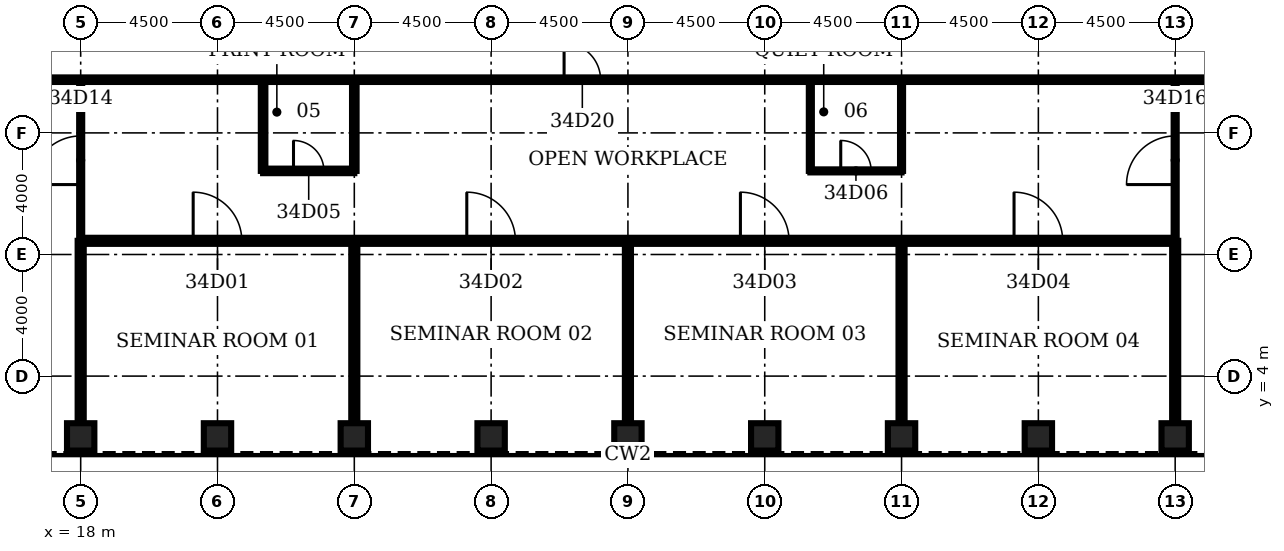
"""IFC4 building model, lengths in metres.
Left out: names, types, materials, properties, quantities, classifications, styles, units other than length and angle.
Written with IfcOpenShell. Run it as: python <this file> out.ifc"""

import sys

from ifc_helpers import new_model, si_unit, direction, frame, frame_2d, origin, origin_2d, place, context, subcontext, project, spatial, rectangle, hollow_rectangle, extrude, element, fill, save


model = new_model("IFC4")
c1 = context("Model", 3, precision=1e-05, world=origin(), true_north=direction((0.0, 1.0)))
c2 = subcontext(c1, "Body", "Model", "MODEL_VIEW")
j1 = project(units=[si_unit("LENGTHUNIT", "METRE"), si_unit("PLANEANGLEUNIT", "RADIAN")], contexts=[c1])
p1 = place(None, origin())
s1 = spatial("IfcSite", under=j1, at=p1, CompositionType="ELEMENT")
p2 = place(p1, origin())
s2 = spatial("IfcBuilding", under=s1, at=p2, CompositionType="ELEMENT")
p3 = place(p2, frame((0.0, 0.0, 155.1)))
s3 = spatial("IfcBuildingStorey", under=s2, at=p3, CompositionType="ELEMENT", Elevation=155.1)
for number, where, z_axis, x_axis in (
    (1, (18.0, 2.0, 0.0), (0.0, 0.0, 1.0), (0.0, 1.0, 0.0)),
    (2, (22.5, 2.0, 0.0), (0.0, 0.0, 1.0), (0.0, 1.0, 0.0)),
    (3, (27.0, 2.0, 0.0), (0.0, 0.0, 1.0), (0.0, 1.0, 0.0)),
    (4, (31.5, 2.0, 0.0), (0.0, 0.0, 1.0), (0.0, 1.0, 0.0)),
    (5, (36.0, 2.0, 0.0), (0.0, 0.0, 1.0), (0.0, 1.0, 0.0)),
    (6, (40.5, 2.0, 0.0), (0.0, 0.0, 1.0), (0.0, 1.0, 0.0)),
    (7, (45.0, 2.0, 0.0), (0.0, 0.0, 1.0), (0.0, 1.0, 0.0)),
    (8, (49.5, 2.0, 0.0), (0.0, 0.0, 1.0), (0.0, 1.0, 0.0)),
    (9, (54.0, 2.0, 0.0), (0.0, 0.0, 1.0), (0.0, 1.0, 0.0)),
):
    element("IfcColumn", number, at=place(p3, frame(where, z_axis=z_axis, x_axis=x_axis)), inside=s3, PredefinedType="COLUMN", context=c2, shape_type="SweptSolid", body=[
        extrude(hollow_rectangle(XDim=0.9, YDim=0.9, WallThickness=0.1, at=origin_2d()), origin(), (0.0, 0.0, 1.0), 4.2),
    ])
p4 = place(p3, frame((18.0, 8.45, 0.0), z_axis=(0.0, 0.0, 1.0), x_axis=(1.0, 0.0, 0.0)))
e10 = element("IfcWall", 10, at=p4, inside=s3, PredefinedType="PARTITIONING", context=c2, shape_type="SweptSolid", body=[
    extrude(rectangle(XDim=36.0, YDim=0.2, at=frame_2d((18.0, 0.0))), origin(), (0.0, 0.0, 1.0), 3.0),
])
p5 = place(p4, frame((3.7, 0.0, 0.0)))
e11 = element("IfcOpeningElement", 11, at=p5, cuts=e10, PredefinedType="OPENING", context=c2, shape_type="SweptSolid", body=[
    extrude(rectangle(XDim=1.6, YDim=2.1, at=frame_2d((0.8, 1.05))), frame((0.0, 0.11, 0.0), z_axis=(0.0, -1.0, 0.0), x_axis=(1.0, 0.0, 0.0)), (0.0, 0.0, 1.0), 0.22),
])
p6 = place(p4, frame((12.7, 0.0, 0.0)))
e12 = element("IfcOpeningElement", 12, at=p6, cuts=e10, PredefinedType="OPENING", context=c2, shape_type="SweptSolid", body=[
    extrude(rectangle(XDim=1.6, YDim=2.1, at=frame_2d((0.8, 1.05))), frame((0.0, 0.11, 0.0), z_axis=(0.0, -1.0, 0.0), x_axis=(1.0, 0.0, 0.0)), (0.0, 0.0, 1.0), 0.22),
])
p7 = place(p4, frame((21.7, 0.0, 0.0)))
e13 = element("IfcOpeningElement", 13, at=p7, cuts=e10, PredefinedType="OPENING", context=c2, shape_type="SweptSolid", body=[
    extrude(rectangle(XDim=1.6, YDim=2.1, at=frame_2d((0.8, 1.05))), frame((0.0, 0.11, 0.0), z_axis=(0.0, -1.0, 0.0), x_axis=(1.0, 0.0, 0.0)), (0.0, 0.0, 1.0), 0.22),
])
p8 = place(p4, frame((30.7, 0.0, 0.0)))
e14 = element("IfcOpeningElement", 14, at=p8, cuts=e10, PredefinedType="OPENING", context=c2, shape_type="SweptSolid", body=[
    extrude(rectangle(XDim=1.6, YDim=2.1, at=frame_2d((0.8, 1.05))), frame((0.0, 0.11, 0.0), z_axis=(0.0, -1.0, 0.0), x_axis=(1.0, 0.0, 0.0)), (0.0, 0.0, 1.0), 0.22),
])
p9 = place(p3, frame((24.0, 10.75, 0.0), z_axis=(0.0, 0.0, 1.0), x_axis=(1.0, 0.0, 0.0)))
e15 = element("IfcWall", 15, at=p9, inside=s3, PredefinedType="PARTITIONING", context=c2, shape_type="SweptSolid", body=[
    extrude(rectangle(XDim=3.0, YDim=0.15, at=frame_2d((1.5, 0.0))), origin(), (0.0, 0.0, 1.0), 3.0),
])
p10 = place(p9, frame((1.0, 0.0, 0.0)))
e16 = element("IfcOpeningElement", 16, at=p10, cuts=e15, PredefinedType="OPENING", context=c2, shape_type="SweptSolid", body=[
    extrude(rectangle(XDim=1.0, YDim=2.1, at=frame_2d((0.5, 1.05))), frame((0.0, 0.085, 0.0), z_axis=(0.0, -1.0, 0.0), x_axis=(1.0, 0.0, 0.0)), (0.0, 0.0, 1.0), 0.17),
])
p11 = place(p3, frame((42.0, 10.75, 0.0), z_axis=(0.0, 0.0, 1.0), x_axis=(1.0, 0.0, 0.0)))
e17 = element("IfcWall", 17, at=p11, inside=s3, PredefinedType="PARTITIONING", context=c2, shape_type="SweptSolid", body=[
    extrude(rectangle(XDim=3.0, YDim=0.1, at=frame_2d((1.5, 0.0))), origin(), (0.0, 0.0, 1.0), 3.0),
])
p12 = place(p11, frame((1.0, 0.0, 0.0)))
e18 = element("IfcOpeningElement", 18, at=p12, cuts=e17, PredefinedType="OPENING", context=c2, shape_type="SweptSolid", body=[
    extrude(rectangle(XDim=1.0, YDim=2.1, at=frame_2d((0.5, 1.05))), frame((0.0, 0.06, 0.0), z_axis=(0.0, -1.0, 0.0), x_axis=(1.0, 0.0, 0.0)), (0.0, 0.0, 1.0), 0.12),
])
p13 = place(p3, frame((15.15, 13.75, 0.0), z_axis=(0.0, 0.0, 1.0), x_axis=(1.0, 0.0, 0.0)))
e19 = element("IfcWall", 19, at=p13, inside=s3, PredefinedType="PARTITIONING", context=c2, shape_type="SweptSolid", body=[
    extrude(rectangle(XDim=41.7, YDim=0.15, at=frame_2d((20.85, 0.0))), origin(), (0.0, 0.0, 1.0), 3.0),
])
p14 = place(p13, frame((18.75, 0.0, 0.0)))
e20 = element("IfcOpeningElement", 20, at=p14, cuts=e19, PredefinedType="OPENING", context=c2, shape_type="SweptSolid", body=[
    extrude(rectangle(XDim=1.2, YDim=2.1, at=frame_2d((0.6, 1.05))), frame((0.0, 0.085, 0.0), z_axis=(0.0, -1.0, 0.0), x_axis=(1.0, 0.0, 0.0)), (0.0, 0.0, 1.0), 0.17),
])
p15 = place(p3, frame((18.0, 2.45, 0.0), z_axis=(0.0, 0.0, 1.0), x_axis=(0.0, 1.0, 0.0)))
e21 = element("IfcWall", 21, at=p15, inside=s3, PredefinedType="PARTITIONING", context=c2, shape_type="SweptSolid", body=[
    extrude(rectangle(XDim=6.0, YDim=0.2, at=frame_2d((3.0, 0.0))), origin(), (0.0, 0.0, 1.0), 3.0),
])
p16 = place(p3, frame((18.0, 8.45, 0.0), z_axis=(0.0, 0.0, 1.0), x_axis=(0.0, 1.0, 0.0)))
e22 = element("IfcWall", 22, at=p16, inside=s3, PredefinedType="PARTITIONING", context=c2, shape_type="SweptSolid", body=[
    extrude(rectangle(XDim=5.3, YDim=0.1, at=frame_2d((2.65, 0.0))), origin(), (0.0, 0.0, 1.0), 3.0),
])
p17 = place(p16, frame((1.85, 0.0, 0.0)))
e23 = element("IfcOpeningElement", 23, at=p17, cuts=e22, PredefinedType="OPENING", context=c2, shape_type="SweptSolid", body=[
    extrude(rectangle(XDim=1.6, YDim=2.1, at=frame_2d((0.8, 1.05))), frame((0.0, 0.06, 0.0), z_axis=(0.0, -1.0, 0.0), x_axis=(1.0, 0.0, 0.0)), (0.0, 0.0, 1.0), 0.12),
])
p18 = place(p3, frame((24.0, 10.75, 0.0), z_axis=(0.0, 0.0, 1.0), x_axis=(0.0, 1.0, 0.0)))
e24 = element("IfcWall", 24, at=p18, inside=s3, PredefinedType="PARTITIONING", context=c2, shape_type="SweptSolid", body=[
    extrude(rectangle(XDim=3.0, YDim=0.15, at=frame_2d((1.5, 0.0))), origin(), (0.0, 0.0, 1.0), 3.0),
])
p19 = place(p3, frame((27.0, 2.45, 0.0), z_axis=(0.0, 0.0, 1.0), x_axis=(0.0, 1.0, 0.0)))
e25 = element("IfcWall", 25, at=p19, inside=s3, PredefinedType="PARTITIONING", context=c2, shape_type="SweptSolid", body=[
    extrude(rectangle(XDim=6.0, YDim=0.2, at=frame_2d((3.0, 0.0))), origin(), (0.0, 0.0, 1.0), 3.0),
])
p20 = place(p3, frame((27.0, 10.75, 0.0), z_axis=(0.0, 0.0, 1.0), x_axis=(0.0, 1.0, 0.0)))
e26 = element("IfcWall", 26, at=p20, inside=s3, PredefinedType="PARTITIONING", context=c2, shape_type="SweptSolid", body=[
    extrude(rectangle(XDim=3.0, YDim=0.15, at=frame_2d((1.5, 0.0))), origin(), (0.0, 0.0, 1.0), 3.0),
])
p21 = place(p3, frame((36.0, 2.45, 0.0), z_axis=(0.0, 0.0, 1.0), x_axis=(0.0, 1.0, 0.0)))
e27 = element("IfcWall", 27, at=p21, inside=s3, PredefinedType="PARTITIONING", context=c2, shape_type="SweptSolid", body=[
    extrude(rectangle(XDim=6.0, YDim=0.2, at=frame_2d((3.0, 0.0))), origin(), (0.0, 0.0, 1.0), 3.0),
])
p22 = place(p3, frame((42.0, 10.75, 0.0), z_axis=(0.0, 0.0, 1.0), x_axis=(0.0, 1.0, 0.0)))
e28 = element("IfcWall", 28, at=p22, inside=s3, PredefinedType="PARTITIONING", context=c2, shape_type="SweptSolid", body=[
    extrude(rectangle(XDim=3.0, YDim=0.1, at=frame_2d((1.5, 0.0))), origin(), (0.0, 0.0, 1.0), 3.0),
])
p23 = place(p3, frame((45.0, 2.45, 0.0), z_axis=(0.0, 0.0, 1.0), x_axis=(0.0, 1.0, 0.0)))
e29 = element("IfcWall", 29, at=p23, inside=s3, PredefinedType="PARTITIONING", context=c2, shape_type="SweptSolid", body=[
    extrude(rectangle(XDim=6.0, YDim=0.2, at=frame_2d((3.0, 0.0))), origin(), (0.0, 0.0, 1.0), 3.0),
])
p24 = place(p3, frame((45.0, 10.75, 0.0), z_axis=(0.0, 0.0, 1.0), x_axis=(0.0, 1.0, 0.0)))
e30 = element("IfcWall", 30, at=p24, inside=s3, PredefinedType="PARTITIONING", context=c2, shape_type="SweptSolid", body=[
    extrude(rectangle(XDim=3.0, YDim=0.1, at=frame_2d((1.5, 0.0))), origin(), (0.0, 0.0, 1.0), 3.0),
])
p25 = place(p3, frame((54.0, 2.45, 0.0), z_axis=(0.0, 0.0, 1.0), x_axis=(0.0, 1.0, 0.0)))
e31 = element("IfcWall", 31, at=p25, inside=s3, PredefinedType="PARTITIONING", context=c2, shape_type="SweptSolid", body=[
    extrude(rectangle(XDim=6.0, YDim=0.2, at=frame_2d((3.0, 0.0))), origin(), (0.0, 0.0, 1.0), 3.0),
])
p26 = place(p3, frame((54.0, 8.45, 0.0), z_axis=(0.0, 0.0, 1.0), x_axis=(0.0, 1.0, 0.0)))
e32 = element("IfcWall", 32, at=p26, inside=s3, PredefinedType="PARTITIONING", context=c2, shape_type="SweptSolid", body=[
    extrude(rectangle(XDim=5.3, YDim=0.1, at=frame_2d((2.65, 0.0))), origin(), (0.0, 0.0, 1.0), 3.0),
])
p27 = place(p26, frame((1.85, 0.0, 0.0)))
e33 = element("IfcOpeningElement", 33, at=p27, cuts=e32, PredefinedType="OPENING", context=c2, shape_type="SweptSolid", body=[
    extrude(rectangle(XDim=1.6, YDim=2.1, at=frame_2d((0.8, 1.05))), frame((0.0, 0.06, 0.0), z_axis=(0.0, -1.0, 0.0), x_axis=(1.0, 0.0, 0.0)), (0.0, 0.0, 1.0), 0.12),
])
p28 = place(p5, origin())
e34 = element("IfcDoor", 34, at=p28, inside=s3, OperationType="SINGLE_SWING_LEFT", PredefinedType="DOOR", context=c2, shape_type="SweptSolid", body=[
    extrude(rectangle(XDim=1.6, YDim=2.1, at=frame_2d((0.8, 1.05))), frame((0.0, 0.025, 0.0), z_axis=(0.0, -1.0, 0.0), x_axis=(1.0, 0.0, 0.0)), (0.0, 0.0, 1.0), 0.05),
])
fill(e11, e34)
p29 = place(p6, origin())
e35 = element("IfcDoor", 35, at=p29, inside=s3, OperationType="SINGLE_SWING_LEFT", PredefinedType="DOOR", context=c2, shape_type="SweptSolid", body=[
    extrude(rectangle(XDim=1.6, YDim=2.1, at=frame_2d((0.8, 1.05))), frame((0.0, 0.025, 0.0), z_axis=(0.0, -1.0, 0.0), x_axis=(1.0, 0.0, 0.0)), (0.0, 0.0, 1.0), 0.05),
])
fill(e12, e35)
p30 = place(p7, origin())
e36 = element("IfcDoor", 36, at=p30, inside=s3, OperationType="SINGLE_SWING_LEFT", PredefinedType="DOOR", context=c2, shape_type="SweptSolid", body=[
    extrude(rectangle(XDim=1.6, YDim=2.1, at=frame_2d((0.8, 1.05))), frame((0.0, 0.025, 0.0), z_axis=(0.0, -1.0, 0.0), x_axis=(1.0, 0.0, 0.0)), (0.0, 0.0, 1.0), 0.05),
])
fill(e13, e36)
p31 = place(p8, origin())
e37 = element("IfcDoor", 37, at=p31, inside=s3, OperationType="SINGLE_SWING_LEFT", PredefinedType="DOOR", context=c2, shape_type="SweptSolid", body=[
    extrude(rectangle(XDim=1.6, YDim=2.1, at=frame_2d((0.8, 1.05))), frame((0.0, 0.025, 0.0), z_axis=(0.0, -1.0, 0.0), x_axis=(1.0, 0.0, 0.0)), (0.0, 0.0, 1.0), 0.05),
])
fill(e14, e37)
p32 = place(p10, origin())
e38 = element("IfcDoor", 38, at=p32, inside=s3, OperationType="SINGLE_SWING_LEFT", PredefinedType="DOOR", context=c2, shape_type="SweptSolid", body=[
    extrude(rectangle(XDim=1.0, YDim=2.1, at=frame_2d((0.5, 1.05))), frame((0.0, 0.025, 0.0), z_axis=(0.0, -1.0, 0.0), x_axis=(1.0, 0.0, 0.0)), (0.0, 0.0, 1.0), 0.05),
])
fill(e16, e38)
p33 = place(p12, origin())
e39 = element("IfcDoor", 39, at=p33, inside=s3, OperationType="SINGLE_SWING_LEFT", PredefinedType="DOOR", context=c2, shape_type="SweptSolid", body=[
    extrude(rectangle(XDim=1.0, YDim=2.1, at=frame_2d((0.5, 1.05))), frame((0.0, 0.025, 0.0), z_axis=(0.0, -1.0, 0.0), x_axis=(1.0, 0.0, 0.0)), (0.0, 0.0, 1.0), 0.05),
])
fill(e18, e39)
p34 = place(p17, origin())
e40 = element("IfcDoor", 40, at=p34, inside=s3, OperationType="SINGLE_SWING_LEFT", PredefinedType="DOOR", context=c2, shape_type="SweptSolid", body=[
    extrude(rectangle(XDim=1.6, YDim=2.1, at=frame_2d((0.8, 1.05))), frame((0.0, 0.025, 0.0), z_axis=(0.0, -1.0, 0.0), x_axis=(1.0, 0.0, 0.0)), (0.0, 0.0, 1.0), 0.05),
])
fill(e23, e40)
p35 = place(p27, origin())
e41 = element("IfcDoor", 41, at=p35, inside=s3, OperationType="SINGLE_SWING_LEFT", PredefinedType="DOOR", context=c2, shape_type="SweptSolid", body=[
    extrude(rectangle(XDim=1.6, YDim=2.1, at=frame_2d((0.8, 1.05))), frame((0.0, 0.025, 0.0), z_axis=(0.0, -1.0, 0.0), x_axis=(1.0, 0.0, 0.0)), (0.0, 0.0, 1.0), 0.05),
])
fill(e33, e41)
p36 = place(p14, origin())
e42 = element("IfcDoor", 42, at=p36, inside=s3, OperationType="SINGLE_SWING_LEFT", PredefinedType="DOOR", context=c2, shape_type="SweptSolid", body=[
    extrude(rectangle(XDim=1.2, YDim=2.1, at=frame_2d((0.6, 1.05))), frame((0.0, 0.025, 0.0), z_axis=(0.0, -1.0, 0.0), x_axis=(1.0, 0.0, 0.0)), (0.0, 0.0, 1.0), 0.05),
])
fill(e20, e42)
save(model, sys.argv[1])
